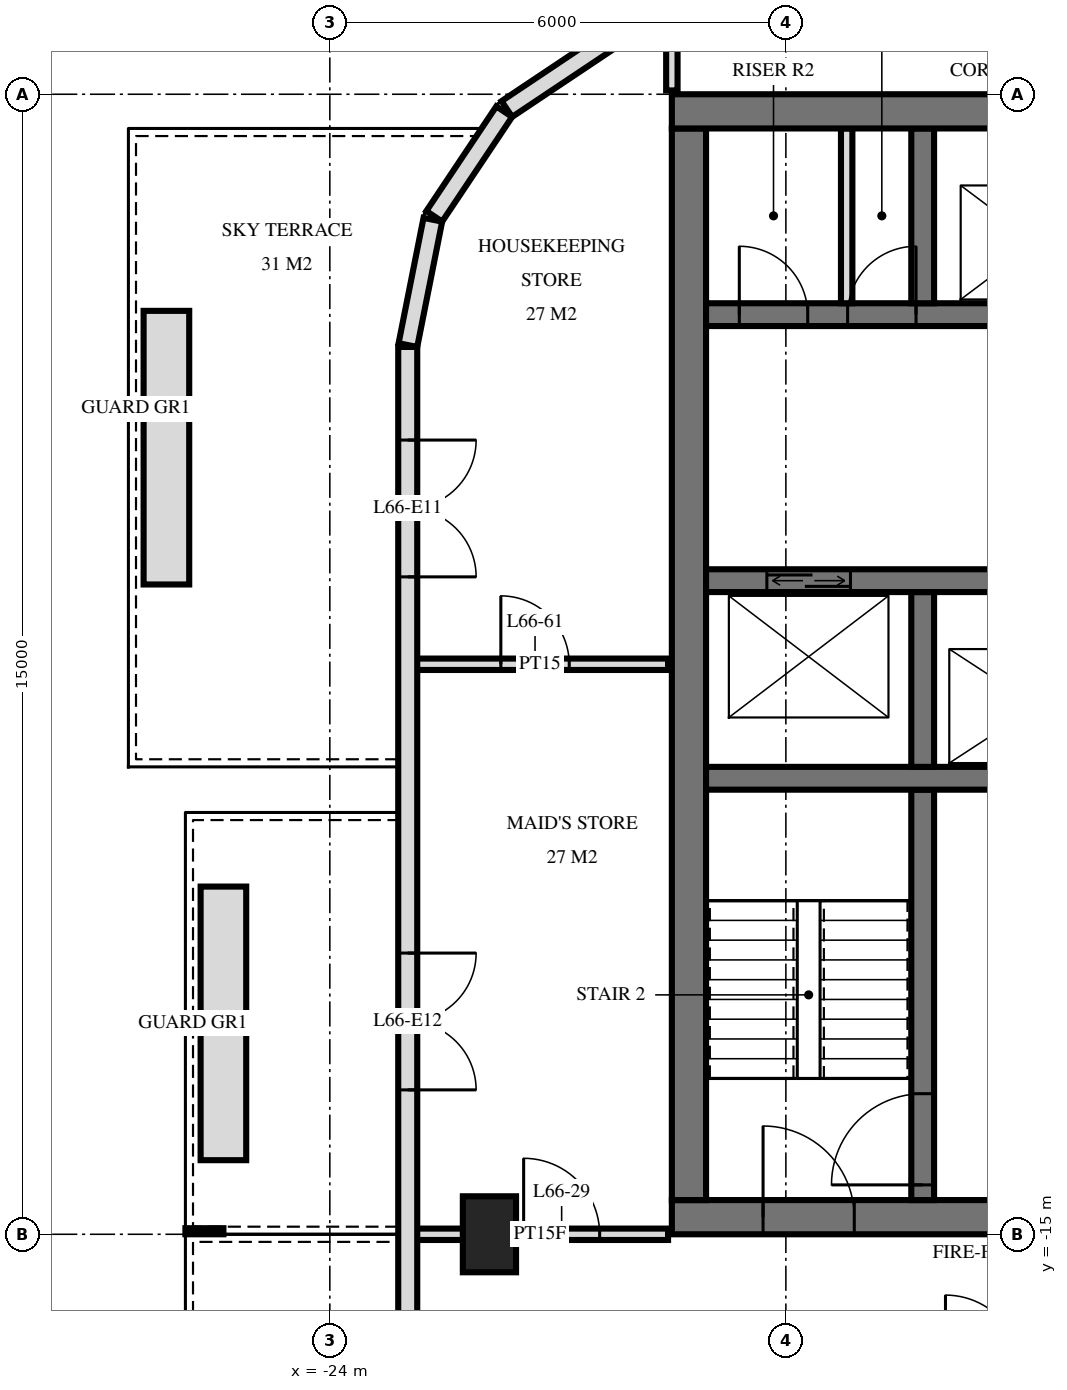
"""IFC4 building model, lengths in metres.
Left out: names, types, materials, properties, quantities, classifications, styles, units other than length and angle.
Written with IfcOpenShell. Run it as: python <this file> out.ifc"""

import sys

from ifc_helpers import new_model, si_unit, direction, frame, frame_2d, origin, origin_2d, place, context, subcontext, project, spatial, rectangle, extrude, element, fill, save


model = new_model("IFC4")
c1 = context("Model", 3, precision=1e-05, world=origin(), true_north=direction((0.0, 1.0)))
c2 = subcontext(c1, "Body", "Model", "MODEL_VIEW")
j1 = project(units=[si_unit("LENGTHUNIT", "METRE"), si_unit("PLANEANGLEUNIT", "RADIAN")], contexts=[c1])
p1 = place(None, origin())
s1 = spatial("IfcSite", under=j1, at=p1, CompositionType="ELEMENT")
p2 = place(p1, origin())
s2 = spatial("IfcBuilding", under=s1, at=p2, CompositionType="ELEMENT")
p3 = place(p2, frame((0.0, 0.0, 252.6)))
s3 = spatial("IfcBuildingStorey", under=s2, at=p3, CompositionType="ELEMENT", Elevation=252.6)
p4 = place(p3, frame((-21.9, -15.0, -0.28), z_axis=(0.0, 0.0, 1.0), x_axis=(0.0, 1.0, 0.0)))
e1 = element("IfcColumn", 1, at=p4, inside=s3, PredefinedType="COLUMN", context=c2, shape_type="SweptSolid", body=[
    extrude(rectangle(XDim=1.0, YDim=0.7, at=origin_2d()), origin(), (0.0, 0.0, 1.0), 3.78),
])
p5 = place(p3, frame((-19.5, -0.225, 0.0), z_axis=(0.0, 0.0, 1.0), x_axis=(1.0, 0.0, 0.0)))
e2 = element("IfcWall", 2, at=p5, inside=s3, PredefinedType="SHEAR", context=c2, shape_type="SweptSolid", body=[
    extrude(rectangle(XDim=9.5, YDim=0.45, at=frame_2d((4.75, 0.0))), origin(), (0.0, 0.0, 1.0), 3.5),
])
p6 = place(p3, frame((-19.5, -14.775, 0.0), z_axis=(0.0, 0.0, 1.0), x_axis=(1.0, 0.0, 0.0)))
e3 = element("IfcWall", 3, at=p6, inside=s3, PredefinedType="SHEAR", context=c2, shape_type="SweptSolid", body=[
    extrude(rectangle(XDim=9.5, YDim=0.45, at=frame_2d((4.75, 0.0))), origin(), (0.0, 0.0, 1.0), 3.5),
])
p7 = place(p6, frame((1.2, 0.0, 0.0)))
e4 = element("IfcOpeningElement", 4, at=p7, cuts=e3, PredefinedType="OPENING", context=c2, shape_type="SweptSolid", body=[
    extrude(rectangle(XDim=1.2, YDim=2.1, at=frame_2d((0.6, 1.05))), frame((0.0, 0.235, 0.0), z_axis=(0.0, -1.0, 0.0), x_axis=(1.0, 0.0, 0.0)), (0.0, 0.0, 1.0), 0.47),
])
p8 = place(p6, frame((4.25, 0.0, 0.0)))
e5 = element("IfcOpeningElement", 5, at=p8, cuts=e3, PredefinedType="OPENING", context=c2, shape_type="SweptSolid", body=[
    extrude(rectangle(XDim=1.1, YDim=2.1, at=frame_2d((0.55, 1.05))), frame((0.0, 0.235, 0.0), z_axis=(0.0, -1.0, 0.0), x_axis=(1.0, 0.0, 0.0)), (0.0, 0.0, 1.0), 0.47),
])
p9 = place(p3, frame((-19.275, -14.55, 0.0), z_axis=(0.0, 0.0, 1.0), x_axis=(0.0, 1.0, 0.0)))
e6 = element("IfcWall", 6, at=p9, inside=s3, PredefinedType="SHEAR", context=c2, shape_type="SweptSolid", body=[
    extrude(rectangle(XDim=14.1, YDim=0.45, at=frame_2d((7.05, 0.0))), origin(), (0.0, 0.0, 1.0), 3.5),
])
p10 = place(p3, frame((-19.05, -2.9, 0.0), z_axis=(0.0, 0.0, 1.0), x_axis=(1.0, 0.0, 0.0)))
e7 = element("IfcWall", 7, at=p10, inside=s3, PredefinedType="SHEAR", context=c2, shape_type="SweptSolid", body=[
    extrude(rectangle(XDim=8.7, YDim=0.3, at=frame_2d((4.35, 0.0))), origin(), (0.0, 0.0, 1.0), 3.5),
])
p11 = place(p10, frame((6.8, 0.0, 0.0)))
e8 = element("IfcOpeningElement", 8, at=p11, cuts=e7, PredefinedType="OPENING", context=c2, shape_type="SweptSolid", body=[
    extrude(rectangle(XDim=1.1, YDim=2.1, at=frame_2d((0.55, 1.05))), frame((0.0, 0.16, 0.0), z_axis=(0.0, -1.0, 0.0), x_axis=(1.0, 0.0, 0.0)), (0.0, 0.0, 1.0), 0.32),
])
p12 = place(p10, frame((3.8, 0.0, 0.0)))
e9 = element("IfcOpeningElement", 9, at=p12, cuts=e7, PredefinedType="OPENING", context=c2, shape_type="SweptSolid", body=[
    extrude(rectangle(XDim=1.1, YDim=2.1, at=frame_2d((0.55, 1.05))), frame((0.0, 0.16, 0.0), z_axis=(0.0, -1.0, 0.0), x_axis=(1.0, 0.0, 0.0)), (0.0, 0.0, 1.0), 0.32),
])
p13 = place(p10, frame((1.863, 0.0, 0.0)))
e10 = element("IfcOpeningElement", 10, at=p13, cuts=e7, PredefinedType="OPENING", context=c2, shape_type="SweptSolid", body=[
    extrude(rectangle(XDim=0.9, YDim=2.1, at=frame_2d((0.45, 1.05))), frame((0.0, 0.16, 0.0), z_axis=(0.0, -1.0, 0.0), x_axis=(1.0, 0.0, 0.0)), (0.0, 0.0, 1.0), 0.32),
])
p14 = place(p10, frame((0.438, 0.0, 0.0)))
e11 = element("IfcOpeningElement", 11, at=p14, cuts=e7, PredefinedType="OPENING", context=c2, shape_type="SweptSolid", body=[
    extrude(rectangle(XDim=0.9, YDim=2.1, at=frame_2d((0.45, 1.05))), frame((0.0, 0.16, 0.0), z_axis=(0.0, -1.0, 0.0), x_axis=(1.0, 0.0, 0.0)), (0.0, 0.0, 1.0), 0.32),
])
p15 = place(p3, frame((-19.05, -6.4, 0.0), z_axis=(0.0, 0.0, 1.0), x_axis=(1.0, 0.0, 0.0)))
e12 = element("IfcWall", 12, at=p15, inside=s3, PredefinedType="SHEAR", context=c2, shape_type="SweptSolid", body=[
    extrude(rectangle(XDim=8.7, YDim=0.3, at=frame_2d((4.35, 0.0))), origin(), (0.0, 0.0, 1.0), 3.5),
])
p16 = place(p15, frame((0.8, 0.0, 0.0)))
e13 = element("IfcOpeningElement", 13, at=p16, cuts=e12, PredefinedType="OPENING", context=c2, shape_type="SweptSolid", body=[
    extrude(rectangle(XDim=1.1, YDim=2.1, at=frame_2d((0.55, 1.05))), frame((0.0, 0.16, 0.0), z_axis=(0.0, -1.0, 0.0), x_axis=(1.0, 0.0, 0.0)), (0.0, 0.0, 1.0), 0.32),
])
p17 = place(p3, frame((-19.05, -9.0, 0.0), z_axis=(0.0, 0.0, 1.0), x_axis=(1.0, 0.0, 0.0)))
e14 = element("IfcWall", 14, at=p17, inside=s3, PredefinedType="SHEAR", context=c2, shape_type="SweptSolid", body=[
    extrude(rectangle(XDim=8.7, YDim=0.3, at=frame_2d((4.35, 0.0))), origin(), (0.0, 0.0, 1.0), 3.5),
])
p18 = place(p17, frame((3.8, 0.0, 0.0)))
e15 = element("IfcOpeningElement", 15, at=p18, cuts=e14, PredefinedType="OPENING", context=c2, shape_type="SweptSolid", body=[
    extrude(rectangle(XDim=1.1, YDim=2.1, at=frame_2d((0.55, 1.05))), frame((0.0, 0.16, 0.0), z_axis=(0.0, -1.0, 0.0), x_axis=(1.0, 0.0, 0.0)), (0.0, 0.0, 1.0), 0.32),
])
for number, where, z_axis, x_axis in (
    (16, (-16.2, -2.75, 0.0), (0.0, 0.0, 1.0), (0.0, 1.0, 0.0)),
    (17, (-16.2, -8.85, 0.0), (0.0, 0.0, 1.0), (0.0, 1.0, 0.0)),
):
    element("IfcWall", number, at=place(p3, frame(where, z_axis=z_axis, x_axis=x_axis)), inside=s3, PredefinedType="SHEAR", context=c2, shape_type="SweptSolid", body=[
        extrude(rectangle(XDim=2.3, YDim=0.3, at=frame_2d((1.15, 0.0))), origin(), (0.0, 0.0, 1.0), 3.5),
    ])
p19 = place(p3, frame((-16.2, -14.55, 0.0), z_axis=(0.0, 0.0, 1.0), x_axis=(0.0, 1.0, 0.0)))
e18 = element("IfcWall", 18, at=p19, inside=s3, PredefinedType="SHEAR", context=c2, shape_type="SweptSolid", body=[
    extrude(rectangle(XDim=5.4, YDim=0.3, at=frame_2d((2.7, 0.0))), origin(), (0.0, 0.0, 1.0), 3.5),
])
p20 = place(p19, frame((0.2, 0.0, 0.0)))
e19 = element("IfcOpeningElement", 19, at=p20, cuts=e18, PredefinedType="OPENING", context=c2, shape_type="SweptSolid", body=[
    extrude(rectangle(XDim=1.2, YDim=2.1, at=frame_2d((0.6, 1.05))), frame((0.0, 0.16, 0.0), z_axis=(0.0, -1.0, 0.0), x_axis=(1.0, 0.0, 0.0)), (0.0, 0.0, 1.0), 0.32),
])
for number, where, z_axis, x_axis in (
    (20, (-20.294, 0.726, 0.0), (0.0, 0.0, 1.0), (-0.831, -0.556, 0.0)),
    (21, (-21.706, -0.229, 0.0), (0.0, 0.0, 1.0), (-0.556, -0.831, 0.0)),
):
    element("IfcWall", number, at=place(p3, frame(where, z_axis=z_axis, x_axis=x_axis)), inside=s3, PredefinedType="SOLIDWALL", context=c2, shape_type="SweptSolid", body=[
        extrude(rectangle(XDim=1.656, YDim=0.25, at=frame_2d((0.828, 0.0))), origin(), (0.0, 0.0, 1.0), 3.22),
    ])
p21 = place(p3, frame((-22.645, -1.651, 0.0), z_axis=(0.0, 0.0, 1.0), x_axis=(-0.19513878023, -0.980775640221, 0.0)))
e22 = element("IfcWall", 22, at=p21, inside=s3, PredefinedType="SOLIDWALL", context=c2, shape_type="SweptSolid", body=[
    extrude(rectangle(XDim=1.681, YDim=0.25, at=frame_2d((0.841, 0.0))), origin(), (0.0, 0.0, 1.0), 3.22),
])
p22 = place(p3, frame((-22.975, -3.325, 0.0), z_axis=(0.0, 0.0, 1.0), x_axis=(0.0, -1.0, 0.0)))
e23 = element("IfcWall", 23, at=p22, inside=s3, PredefinedType="SOLIDWALL", context=c2, shape_type="SweptSolid", body=[
    extrude(rectangle(XDim=25.951, YDim=0.25, at=frame_2d((12.975, 0.0))), origin(), (0.0, 0.0, 1.0), 3.22),
])
p23 = place(p22, frame((1.225, 0.0, 0.0)))
e24 = element("IfcOpeningElement", 24, at=p23, cuts=e23, PredefinedType="OPENING", context=c2, shape_type="SweptSolid", body=[
    extrude(rectangle(XDim=1.8, YDim=2.4, at=frame_2d((0.9, 1.2))), frame((0.0, 0.135, 0.0), z_axis=(0.0, -1.0, 0.0), x_axis=(1.0, 0.0, 0.0)), (0.0, 0.0, 1.0), 0.27),
])
p24 = place(p22, frame((7.975, 0.0, 0.0)))
e25 = element("IfcOpeningElement", 25, at=p24, cuts=e23, PredefinedType="OPENING", context=c2, shape_type="SweptSolid", body=[
    extrude(rectangle(XDim=1.8, YDim=2.4, at=frame_2d((0.9, 1.2))), frame((0.0, 0.135, 0.0), z_axis=(0.0, -1.0, 0.0), x_axis=(1.0, 0.0, 0.0)), (0.0, 0.0, 1.0), 0.27),
])
p25 = place(p22, frame((18.175, 0.0, 0.0)))
e26 = element("IfcOpeningElement", 26, at=p25, cuts=e23, PredefinedType="OPENING", context=c2, shape_type="SweptSolid", body=[
    extrude(rectangle(XDim=1.8, YDim=2.4, at=frame_2d((0.9, 1.2))), frame((0.0, 0.135, 0.0), z_axis=(0.0, -1.0, 0.0), x_axis=(1.0, 0.0, 0.0)), (0.0, 0.0, 1.0), 0.27),
])
p26 = place(p22, frame((21.075, 0.0, 0.0)))
e27 = element("IfcOpeningElement", 27, at=p26, cuts=e23, PredefinedType="OPENING", context=c2, shape_type="SweptSolid", body=[
    extrude(rectangle(XDim=1.8, YDim=2.4, at=frame_2d((0.9, 1.2))), frame((0.0, 0.135, 0.0), z_axis=(0.0, -1.0, 0.0), x_axis=(1.0, 0.0, 0.0)), (0.0, 0.0, 1.0), 0.27),
])
p27 = place(p22, frame((23.825, 0.0, 0.9)))
e28 = element("IfcOpeningElement", 28, at=p27, cuts=e23, PredefinedType="OPENING", context=c2, shape_type="SweptSolid", body=[
    extrude(rectangle(XDim=1.8, YDim=1.5, at=frame_2d((0.9, 0.75))), frame((0.0, 0.135, 0.0), z_axis=(0.0, -1.0, 0.0), x_axis=(1.0, 0.0, 0.0)), (0.0, 0.0, 1.0), 0.27),
])
for number, where, z_axis, x_axis in (
    (29, (-25.4, -14.025, 0.0), (0.0, 0.0, 1.0), (0.0, 1.0, 0.0)),
    (30, (-26.15, -6.45, 0.0), (0.0, 0.0, 1.0), (0.0, 1.0, 0.0)),
):
    element("IfcWall", number, at=place(p3, frame(where, z_axis=z_axis, x_axis=x_axis)), inside=s3, PredefinedType="USERDEFINED", context=c2, shape_type="SweptSolid", body=[
        extrude(rectangle(XDim=3.6, YDim=0.6, at=frame_2d((1.8, 0.0))), origin(), (0.0, 0.0, 1.0), 0.65),
    ])
p28 = place(p3, frame((-17.2, -2.75, 0.0), z_axis=(0.0, 0.0, 1.0), x_axis=(0.0, 1.0, 0.0)))
e31 = element("IfcWall", 31, at=p28, inside=s3, PredefinedType="PARTITIONING", context=c2, shape_type="SweptSolid", body=[
    extrude(rectangle(XDim=2.3, YDim=0.15, at=frame_2d((1.15, 0.0))), origin(), (0.0, 0.0, 1.0), 3.2),
])
p29 = place(p3, frame((-19.5, 0.05, 0.0), z_axis=(0.0, 0.0, 1.0), x_axis=(0.0, 1.0, 0.0)))
e32 = element("IfcWall", 32, at=p29, inside=s3, PredefinedType="PARTITIONING", context=c2, shape_type="SweptSolid", body=[
    extrude(rectangle(XDim=0.787, YDim=0.15, at=frame_2d((0.394, 0.0))), origin(), (0.0, 0.0, 1.0), 3.22),
])
p30 = place(p3, frame((-22.92, -15.0, 0.0), z_axis=(0.0, 0.0, 1.0), x_axis=(1.0, 0.0, 0.0)))
e33 = element("IfcWall", 33, at=p30, inside=s3, PredefinedType="PARTITIONING", context=c2, shape_type="SweptSolid", body=[
    extrude(rectangle(XDim=3.37, YDim=0.15, at=frame_2d((1.685, 0.0))), origin(), (0.0, 0.0, 1.0), 3.22),
])
p31 = place(p30, frame((1.47, 0.0, 0.0)))
e34 = element("IfcOpeningElement", 34, at=p31, cuts=e33, PredefinedType="OPENING", context=c2, shape_type="SweptSolid", body=[
    extrude(rectangle(XDim=1.0, YDim=2.1, at=frame_2d((0.5, 1.05))), frame((0.0, 0.085, 0.0), z_axis=(0.0, -1.0, 0.0), x_axis=(1.0, 0.0, 0.0)), (0.0, 0.0, 1.0), 0.17),
])
p32 = place(p3, frame((-22.92, -7.5, 0.0), z_axis=(0.0, 0.0, 1.0), x_axis=(1.0, 0.0, 0.0)))
e35 = element("IfcWall", 35, at=p32, inside=s3, PredefinedType="PARTITIONING", context=c2, shape_type="SweptSolid", body=[
    extrude(rectangle(XDim=3.37, YDim=0.15, at=frame_2d((1.685, 0.0))), origin(), (0.0, 0.0, 1.0), 3.22),
])
p33 = place(p32, frame((1.17, 0.0, 0.0)))
e36 = element("IfcOpeningElement", 36, at=p33, cuts=e35, PredefinedType="OPENING", context=c2, shape_type="SweptSolid", body=[
    extrude(rectangle(XDim=0.9, YDim=2.1, at=frame_2d((0.45, 1.05))), frame((0.0, 0.085, 0.0), z_axis=(0.0, -1.0, 0.0), x_axis=(1.0, 0.0, 0.0)), (0.0, 0.0, 1.0), 0.17),
])
p34 = place(p23, origin())
e37 = element("IfcDoor", 37, at=p34, inside=s3, OperationType="DOUBLE_DOOR_SINGLE_SWING", PredefinedType="DOOR", context=c2, shape_type="SweptSolid", body=[
    extrude(rectangle(XDim=1.8, YDim=2.4, at=frame_2d((0.9, 1.2))), frame((0.0, 0.025, 0.0), z_axis=(0.0, -1.0, 0.0), x_axis=(1.0, 0.0, 0.0)), (0.0, 0.0, 1.0), 0.05),
])
fill(e24, e37)
p35 = place(p24, origin())
e38 = element("IfcDoor", 38, at=p35, inside=s3, OperationType="DOUBLE_DOOR_SINGLE_SWING", PredefinedType="DOOR", context=c2, shape_type="SweptSolid", body=[
    extrude(rectangle(XDim=1.8, YDim=2.4, at=frame_2d((0.9, 1.2))), frame((0.0, 0.025, 0.0), z_axis=(0.0, -1.0, 0.0), x_axis=(1.0, 0.0, 0.0)), (0.0, 0.0, 1.0), 0.05),
])
fill(e25, e38)
p36 = place(p16, origin())
e39 = element("IfcDoor", 39, at=p36, inside=s3, OperationType="DOUBLE_DOOR_SLIDING", PredefinedType="USERDEFINED", context=c2, shape_type="SweptSolid", body=[
    extrude(rectangle(XDim=1.1, YDim=2.1, at=frame_2d((0.55, 1.05))), frame((0.0, 0.025, 0.0), z_axis=(0.0, -1.0, 0.0), x_axis=(1.0, 0.0, 0.0)), (0.0, 0.0, 1.0), 0.05),
])
fill(e13, e39)
p37 = place(p7, origin())
e40 = element("IfcDoor", 40, at=p37, inside=s3, OperationType="SINGLE_SWING_RIGHT", PredefinedType="DOOR", context=c2, shape_type="SweptSolid", body=[
    extrude(rectangle(XDim=1.2, YDim=2.1, at=frame_2d((0.6, 1.05))), frame((0.0, 0.025, 0.0), z_axis=(0.0, -1.0, 0.0), x_axis=(1.0, 0.0, 0.0)), (0.0, 0.0, 1.0), 0.05),
])
fill(e4, e40)
p38 = place(p13, origin())
e41 = element("IfcDoor", 41, at=p38, inside=s3, OperationType="SINGLE_SWING_LEFT", PredefinedType="DOOR", context=c2, shape_type="SweptSolid", body=[
    extrude(rectangle(XDim=0.9, YDim=2.1, at=frame_2d((0.45, 1.05))), frame((0.0, 0.025, 0.0), z_axis=(0.0, -1.0, 0.0), x_axis=(1.0, 0.0, 0.0)), (0.0, 0.0, 1.0), 0.05),
])
fill(e10, e41)
p39 = place(p14, origin())
e42 = element("IfcDoor", 42, at=p39, inside=s3, OperationType="SINGLE_SWING_RIGHT", PredefinedType="DOOR", context=c2, shape_type="SweptSolid", body=[
    extrude(rectangle(XDim=0.9, YDim=2.1, at=frame_2d((0.45, 1.05))), frame((0.0, 0.025, 0.0), z_axis=(0.0, -1.0, 0.0), x_axis=(1.0, 0.0, 0.0)), (0.0, 0.0, 1.0), 0.05),
])
fill(e11, e42)
p40 = place(p20, origin())
e43 = element("IfcDoor", 43, at=p40, inside=s3, OperationType="SINGLE_SWING_RIGHT", PredefinedType="DOOR", context=c2, shape_type="SweptSolid", body=[
    extrude(rectangle(XDim=1.2, YDim=2.1, at=frame_2d((0.6, 1.05))), frame((0.0, 0.025, 0.0), z_axis=(0.0, -1.0, 0.0), x_axis=(1.0, 0.0, 0.0)), (0.0, 0.0, 1.0), 0.05),
])
fill(e19, e43)
p41 = place(p31, origin())
e44 = element("IfcDoor", 44, at=p41, inside=s3, OperationType="SINGLE_SWING_RIGHT", PredefinedType="DOOR", context=c2, shape_type="SweptSolid", body=[
    extrude(rectangle(XDim=1.0, YDim=2.1, at=frame_2d((0.5, 1.05))), frame((0.0, 0.025, 0.0), z_axis=(0.0, -1.0, 0.0), x_axis=(1.0, 0.0, 0.0)), (0.0, 0.0, 1.0), 0.05),
])
fill(e34, e44)
p42 = place(p33, origin())
e45 = element("IfcDoor", 45, at=p42, inside=s3, OperationType="SINGLE_SWING_RIGHT", PredefinedType="DOOR", context=c2, shape_type="SweptSolid", body=[
    extrude(rectangle(XDim=0.9, YDim=2.1, at=frame_2d((0.45, 1.05))), frame((0.0, 0.025, 0.0), z_axis=(0.0, -1.0, 0.0), x_axis=(1.0, 0.0, 0.0)), (0.0, 0.0, 1.0), 0.05),
])
fill(e36, e45)
save(model, sys.argv[1])
